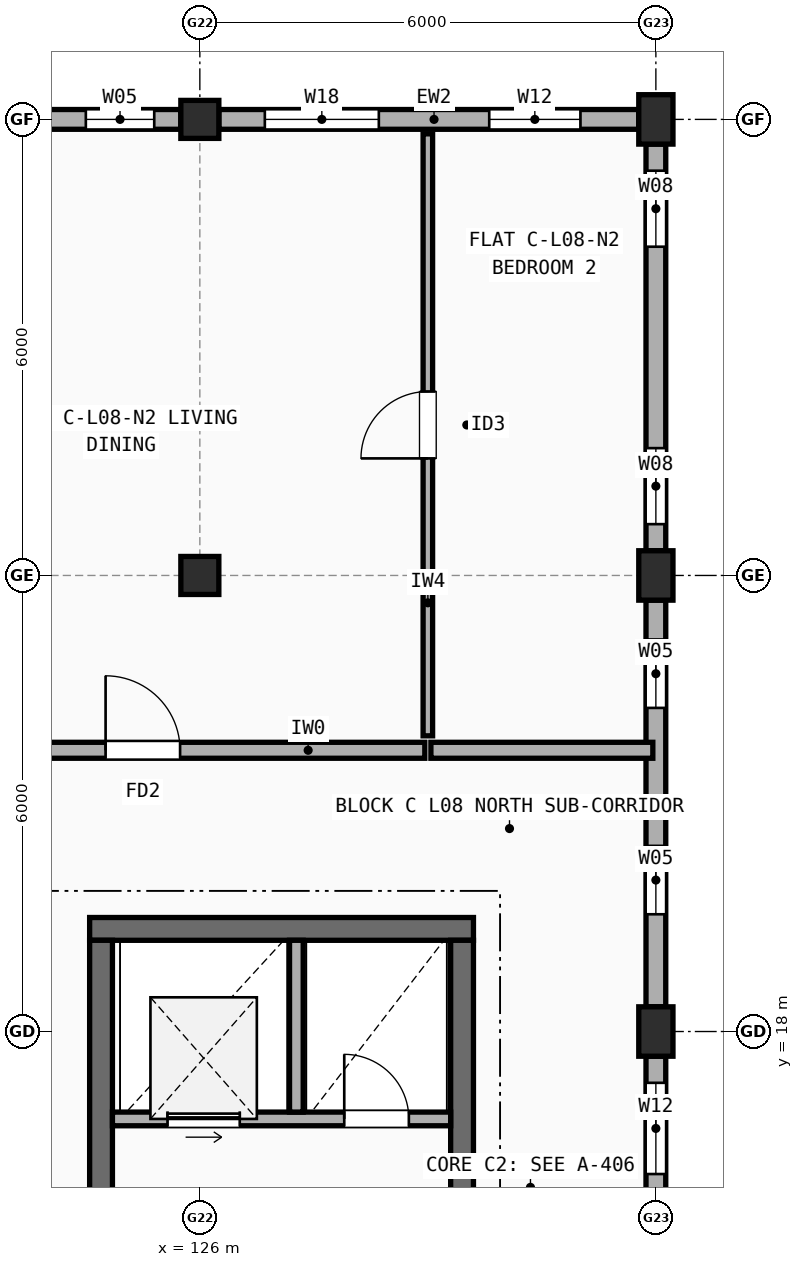
"""IFC4 building model, lengths in metres.
Left out: names, types, materials, properties, quantities, classifications, styles, units other than length and angle.
Written with IfcOpenShell. Run it as: python <this file> out.ifc"""

import sys

from ifc_helpers import new_model, si_unit, direction, frame, frame_2d, origin, origin_2d, place, context, subcontext, project, spatial, rectangle, extrude, element, fill, save


model = new_model("IFC4")
c1 = context("Model", 3, precision=1e-05, world=origin(), true_north=direction((0.0, 1.0)))
c2 = subcontext(c1, "Body", "Model", "MODEL_VIEW")
j1 = project(units=[si_unit("LENGTHUNIT", "METRE"), si_unit("PLANEANGLEUNIT", "RADIAN")], contexts=[c1])
p1 = place(None, origin())
s1 = spatial("IfcSite", under=j1, at=p1, CompositionType="ELEMENT")
p2 = place(p1, origin())
s2 = spatial("IfcBuilding", under=s1, at=p2, CompositionType="ELEMENT")
p3 = place(p2, frame((0.0, 0.0, 26.9)))
s3 = spatial("IfcBuildingStorey", under=s2, at=p3, CompositionType="ELEMENT", Elevation=26.9)
for number, where, z_axis, x_axis in (
    (1, (126.0, 24.0, 0.0), (0.0, 0.0, 1.0), (1.0, 0.0, 0.0)),
    (2, (126.0, 30.0, 0.0), (0.0, 0.0, 1.0), (1.0, 0.0, 0.0)),
):
    element("IfcColumn", number, at=place(p3, frame(where, z_axis=z_axis, x_axis=x_axis)), inside=s3, PredefinedType="COLUMN", context=c2, shape_type="SweptSolid", body=[
        extrude(rectangle(XDim=0.5, YDim=0.5, at=origin_2d()), origin(), (0.0, 0.0, 1.0), 2.98),
    ])
for number, where, z_axis, x_axis in (
    (3, (132.0, 18.0, 0.0), (0.0, 0.0, 1.0), (1.0, 0.0, 0.0)),
    (4, (132.0, 24.0, 0.0), (0.0, 0.0, 1.0), (1.0, 0.0, 0.0)),
    (5, (132.0, 30.0, 0.0), (0.0, 0.0, 1.0), (1.0, 0.0, 0.0)),
):
    element("IfcColumn", number, at=place(p3, frame(where, z_axis=z_axis, x_axis=x_axis)), inside=s3, PredefinedType="COLUMN", context=c2, shape_type="SweptSolid", body=[
        extrude(rectangle(XDim=0.45, YDim=0.65, at=origin_2d()), origin(), (0.0, 0.0, 1.0), 2.98),
    ])
p4 = place(p3, frame((132.0, 12.325, 0.0), z_axis=(0.0, 0.0, 1.0), x_axis=(0.0, 1.0, 0.0)))
e6 = element("IfcWall", 6, at=p4, inside=s3, PredefinedType="STANDARD", context=c2, shape_type="SweptSolid", body=[
    extrude(rectangle(XDim=5.35, YDim=0.26, at=frame_2d((2.675, 0.0))), origin(), (0.0, 0.0, 1.0), 2.462),
])
p5 = place(p4, frame((0.35, 0.0, 0.9)))
e7 = element("IfcOpeningElement", 7, at=p5, cuts=e6, PredefinedType="OPENING", context=c2, shape_type="SweptSolid", body=[
    extrude(rectangle(XDim=1.2, YDim=1.35, at=frame_2d((0.6, 0.675))), frame((0.0, 0.14, 0.0), z_axis=(0.0, -1.0, 0.0), x_axis=(1.0, 0.0, 0.0)), (0.0, 0.0, 1.0), 0.28),
])
p6 = place(p4, frame((3.8, 0.0, 0.9)))
e8 = element("IfcOpeningElement", 8, at=p6, cuts=e6, PredefinedType="OPENING", context=c2, shape_type="SweptSolid", body=[
    extrude(rectangle(XDim=1.2, YDim=1.35, at=frame_2d((0.6, 0.675))), frame((0.0, 0.14, 0.0), z_axis=(0.0, -1.0, 0.0), x_axis=(1.0, 0.0, 0.0)), (0.0, 0.0, 1.0), 0.28),
])
p7 = place(p3, frame((132.0, 18.325, 0.0), z_axis=(0.0, 0.0, 1.0), x_axis=(0.0, 1.0, 0.0)))
e9 = element("IfcWall", 9, at=p7, inside=s3, PredefinedType="STANDARD", context=c2, shape_type="SweptSolid", body=[
    extrude(rectangle(XDim=5.35, YDim=0.26, at=frame_2d((2.675, 0.0))), origin(), (0.0, 0.0, 1.0), 2.462),
])
p8 = place(p7, frame((1.218, 0.0, 0.9)))
e10 = element("IfcOpeningElement", 10, at=p8, cuts=e9, PredefinedType="OPENING", context=c2, shape_type="SweptSolid", body=[
    extrude(rectangle(XDim=0.9, YDim=1.4, at=frame_2d((0.45, 0.7))), frame((0.0, 0.14, 0.0), z_axis=(0.0, -1.0, 0.0), x_axis=(1.0, 0.0, 0.0)), (0.0, 0.0, 1.0), 0.28),
])
p9 = place(p7, frame((3.933, 0.0, 0.9)))
e11 = element("IfcOpeningElement", 11, at=p9, cuts=e9, PredefinedType="OPENING", context=c2, shape_type="SweptSolid", body=[
    extrude(rectangle(XDim=0.9, YDim=1.4, at=frame_2d((0.45, 0.7))), frame((0.0, 0.14, 0.0), z_axis=(0.0, -1.0, 0.0), x_axis=(1.0, 0.0, 0.0)), (0.0, 0.0, 1.0), 0.28),
])
p10 = place(p3, frame((132.0, 24.325, 0.0), z_axis=(0.0, 0.0, 1.0), x_axis=(0.0, 1.0, 0.0)))
e12 = element("IfcWall", 12, at=p10, inside=s3, PredefinedType="STANDARD", context=c2, shape_type="SweptSolid", body=[
    extrude(rectangle(XDim=5.35, YDim=0.26, at=frame_2d((2.675, 0.0))), origin(), (0.0, 0.0, 1.0), 2.462),
])
p11 = place(p10, frame((0.35, 0.0, 0.9)))
e13 = element("IfcOpeningElement", 13, at=p11, cuts=e12, PredefinedType="OPENING", context=c2, shape_type="SweptSolid", body=[
    extrude(rectangle(XDim=1.0, YDim=1.4, at=frame_2d((0.5, 0.7))), frame((0.0, 0.14, 0.0), z_axis=(0.0, -1.0, 0.0), x_axis=(1.0, 0.0, 0.0)), (0.0, 0.0, 1.0), 0.28),
])
p12 = place(p10, frame((4.0, 0.0, 0.9)))
e14 = element("IfcOpeningElement", 14, at=p12, cuts=e12, PredefinedType="OPENING", context=c2, shape_type="SweptSolid", body=[
    extrude(rectangle(XDim=1.0, YDim=1.4, at=frame_2d((0.5, 0.7))), frame((0.0, 0.14, 0.0), z_axis=(0.0, -1.0, 0.0), x_axis=(1.0, 0.0, 0.0)), (0.0, 0.0, 1.0), 0.28),
])
p13 = place(p3, frame((131.775, 30.0, 0.0), z_axis=(0.0, 0.0, 1.0), x_axis=(-1.0, 0.0, 0.0)))
e15 = element("IfcWall", 15, at=p13, inside=s3, PredefinedType="STANDARD", context=c2, shape_type="SweptSolid", body=[
    extrude(rectangle(XDim=5.525, YDim=0.26, at=frame_2d((2.762, 0.0))), origin(), (0.0, 0.0, 1.0), 2.462),
])
p14 = place(p13, frame((0.768, 0.0, 0.9)))
e16 = element("IfcOpeningElement", 16, at=p14, cuts=e15, PredefinedType="OPENING", context=c2, shape_type="SweptSolid", body=[
    extrude(rectangle(XDim=1.2, YDim=1.35, at=frame_2d((0.6, 0.675))), frame((0.0, 0.14, 0.0), z_axis=(0.0, -1.0, 0.0), x_axis=(1.0, 0.0, 0.0)), (0.0, 0.0, 1.0), 0.28),
])
p15 = place(p13, frame((3.42, 0.0, 0.9)))
e17 = element("IfcOpeningElement", 17, at=p15, cuts=e15, PredefinedType="OPENING", context=c2, shape_type="SweptSolid", body=[
    extrude(rectangle(XDim=1.5, YDim=1.4, at=frame_2d((0.75, 0.7))), frame((0.0, 0.14, 0.0), z_axis=(0.0, -1.0, 0.0), x_axis=(1.0, 0.0, 0.0)), (0.0, 0.0, 1.0), 0.28),
])
p16 = place(p3, frame((125.75, 30.0, 0.0), z_axis=(0.0, 0.0, 1.0), x_axis=(-1.0, 0.0, 0.0)))
e18 = element("IfcWall", 18, at=p16, inside=s3, PredefinedType="STANDARD", context=c2, shape_type="SweptSolid", body=[
    extrude(rectangle(XDim=5.5, YDim=0.26, at=frame_2d((2.75, 0.0))), origin(), (0.0, 0.0, 1.0), 2.462),
])
p17 = place(p16, frame((0.35, 0.0, 0.9)))
e19 = element("IfcOpeningElement", 19, at=p17, cuts=e18, PredefinedType="OPENING", context=c2, shape_type="SweptSolid", body=[
    extrude(rectangle(XDim=0.9, YDim=1.4, at=frame_2d((0.45, 0.7))), frame((0.0, 0.14, 0.0), z_axis=(0.0, -1.0, 0.0), x_axis=(1.0, 0.0, 0.0)), (0.0, 0.0, 1.0), 0.28),
])
p18 = place(p16, frame((2.96, 0.0, 0.9)))
e20 = element("IfcOpeningElement", 20, at=p18, cuts=e18, PredefinedType="OPENING", context=c2, shape_type="SweptSolid", body=[
    extrude(rectangle(XDim=0.9, YDim=1.4, at=frame_2d((0.45, 0.7))), frame((0.0, 0.14, 0.0), z_axis=(0.0, -1.0, 0.0), x_axis=(1.0, 0.0, 0.0)), (0.0, 0.0, 1.0), 0.28),
])
p19 = place(p3, frame((129.6, 19.35, 0.0), z_axis=(0.0, 0.0, 1.0), x_axis=(-1.0, 0.0, 0.0)))
e21 = element("IfcWall", 21, at=p19, inside=s3, PredefinedType="SHEAR", context=c2, shape_type="SweptSolid", body=[
    extrude(rectangle(XDim=5.05, YDim=0.3, at=frame_2d((2.525, 0.0))), origin(), (0.0, 0.0, 1.0), 2.98),
])
p20 = place(p3, frame((129.45, 12.75, 0.0), z_axis=(0.0, 0.0, 1.0), x_axis=(0.0, 1.0, 0.0)))
e22 = element("IfcWall", 22, at=p20, inside=s3, PredefinedType="SHEAR", context=c2, shape_type="SweptSolid", body=[
    extrude(rectangle(XDim=6.45, YDim=0.3, at=frame_2d((3.225, 0.0))), origin(), (0.0, 0.0, 1.0), 2.98),
])
p21 = place(p3, frame((124.7, 15.65, 0.0), z_axis=(0.0, 0.0, 1.0), x_axis=(0.0, 1.0, 0.0)))
e23 = element("IfcWall", 23, at=p21, inside=s3, PredefinedType="SHEAR", context=c2, shape_type="SweptSolid", body=[
    extrude(rectangle(XDim=3.55, YDim=0.3, at=frame_2d((1.775, 0.0))), origin(), (0.0, 0.0, 1.0), 2.98),
])
p22 = place(p3, frame((124.85, 16.85, 0.0), z_axis=(0.0, 0.0, 1.0), x_axis=(1.0, 0.0, 0.0)))
e24 = element("IfcWall", 24, at=p22, inside=s3, PredefinedType="SOLIDWALL", context=c2, shape_type="SweptSolid", body=[
    extrude(rectangle(XDim=4.45, YDim=0.18, at=frame_2d((2.225, 0.0))), origin(), (0.0, 0.0, 1.0), 2.98),
])
p23 = place(p22, frame((0.725, 0.0, 0.0)))
e25 = element("IfcOpeningElement", 25, at=p23, cuts=e24, PredefinedType="OPENING", context=c2, shape_type="SweptSolid", body=[
    extrude(rectangle(XDim=0.95, YDim=2.15, at=frame_2d((0.475, 1.075))), frame((0.0, 0.1, 0.0), z_axis=(0.0, -1.0, 0.0), x_axis=(1.0, 0.0, 0.0)), (0.0, 0.0, 1.0), 0.2),
])
p24 = place(p22, frame((3.05, 0.0, 0.0)))
e26 = element("IfcOpeningElement", 26, at=p24, cuts=e24, PredefinedType="OPENING", context=c2, shape_type="SweptSolid", body=[
    extrude(rectangle(XDim=0.85, YDim=2.1, at=frame_2d((0.425, 1.05))), frame((0.0, 0.1, 0.0), z_axis=(0.0, -1.0, 0.0), x_axis=(1.0, 0.0, 0.0)), (0.0, 0.0, 1.0), 0.2),
])
p25 = place(p3, frame((127.27, 16.94, 0.0), z_axis=(0.0, 0.0, 1.0), x_axis=(0.0, 1.0, 0.0)))
e27 = element("IfcWall", 27, at=p25, inside=s3, PredefinedType="SOLIDWALL", context=c2, shape_type="SweptSolid", body=[
    extrude(rectangle(XDim=2.26, YDim=0.18, at=frame_2d((1.13, 0.0))), origin(), (0.0, 0.0, 1.0), 2.98),
])
p26 = place(p3, frame((121.54, 21.7, 0.0), z_axis=(0.0, 0.0, 1.0), x_axis=(1.0, 0.0, 0.0)))
e28 = element("IfcWall", 28, at=p26, inside=s3, PredefinedType="SOLIDWALL", context=c2, shape_type="SweptSolid", body=[
    extrude(rectangle(XDim=7.42, YDim=0.21, at=frame_2d((3.71, 0.0))), origin(), (0.0, 0.0, 1.0), 2.98),
])
p27 = place(p26, frame((3.22, 0.0, 0.0)))
e29 = element("IfcOpeningElement", 29, at=p27, cuts=e28, PredefinedType="OPENING", context=c2, shape_type="SweptSolid", body=[
    extrude(rectangle(XDim=0.98, YDim=2.15, at=frame_2d((0.49, 1.075))), frame((0.0, 0.115, 0.0), z_axis=(0.0, -1.0, 0.0), x_axis=(1.0, 0.0, 0.0)), (0.0, 0.0, 1.0), 0.23),
])
p28 = place(p3, frame((129.04, 21.7, 0.0), z_axis=(0.0, 0.0, 1.0), x_axis=(1.0, 0.0, 0.0)))
e30 = element("IfcWall", 30, at=p28, inside=s3, PredefinedType="SOLIDWALL", context=c2, shape_type="SweptSolid", body=[
    extrude(rectangle(XDim=2.92, YDim=0.21, at=frame_2d((1.46, 0.0))), origin(), (0.0, 0.0, 1.0), 2.462),
])
p29 = place(p3, frame((129.0, 21.89, 0.0), z_axis=(0.0, 0.0, 1.0), x_axis=(0.0, 1.0, 0.0)))
e31 = element("IfcWall", 31, at=p29, inside=s3, PredefinedType="PARTITIONING", context=c2, shape_type="SweptSolid", body=[
    extrude(rectangle(XDim=7.92, YDim=0.125, at=frame_2d((3.96, 0.0))), origin(), (0.0, 0.0, 1.0), 2.408),
])
p30 = place(p29, frame((3.65, 0.0, 0.0)))
e32 = element("IfcOpeningElement", 32, at=p30, cuts=e31, PredefinedType="OPENING", context=c2, shape_type="SweptSolid", body=[
    extrude(rectangle(XDim=0.88, YDim=2.1, at=frame_2d((0.44, 1.05))), frame((0.0, 0.073, 0.0), z_axis=(0.0, -1.0, 0.0), x_axis=(1.0, 0.0, 0.0)), (0.0, 0.0, 1.0), 0.145),
])
p31 = place(p6, origin())
e33 = element("IfcWindow", 33, at=p31, inside=s3, PartitioningType="SINGLE_PANEL", PredefinedType="WINDOW", context=c2, shape_type="SweptSolid", body=[
    extrude(rectangle(XDim=1.2, YDim=1.35, at=frame_2d((0.6, 0.675))), frame((0.0, 0.03, 0.0), z_axis=(0.0, -1.0, 0.0), x_axis=(1.0, 0.0, 0.0)), (0.0, 0.0, 1.0), 0.06),
])
fill(e8, e33)
p32 = place(p8, origin())
e34 = element("IfcWindow", 34, at=p32, inside=s3, PartitioningType="SINGLE_PANEL", PredefinedType="WINDOW", context=c2, shape_type="SweptSolid", body=[
    extrude(rectangle(XDim=0.9, YDim=1.4, at=frame_2d((0.45, 0.7))), frame((0.0, 0.03, 0.0), z_axis=(0.0, -1.0, 0.0), x_axis=(1.0, 0.0, 0.0)), (0.0, 0.0, 1.0), 0.06),
])
fill(e10, e34)
p33 = place(p9, origin())
e35 = element("IfcWindow", 35, at=p33, inside=s3, PartitioningType="SINGLE_PANEL", PredefinedType="WINDOW", context=c2, shape_type="SweptSolid", body=[
    extrude(rectangle(XDim=0.9, YDim=1.4, at=frame_2d((0.45, 0.7))), frame((0.0, 0.03, 0.0), z_axis=(0.0, -1.0, 0.0), x_axis=(1.0, 0.0, 0.0)), (0.0, 0.0, 1.0), 0.06),
])
fill(e11, e35)
p34 = place(p11, origin())
e36 = element("IfcWindow", 36, at=p34, inside=s3, PartitioningType="SINGLE_PANEL", PredefinedType="WINDOW", context=c2, shape_type="SweptSolid", body=[
    extrude(rectangle(XDim=1.0, YDim=1.4, at=frame_2d((0.5, 0.7))), frame((0.0, 0.03, 0.0), z_axis=(0.0, -1.0, 0.0), x_axis=(1.0, 0.0, 0.0)), (0.0, 0.0, 1.0), 0.06),
])
fill(e13, e36)
p35 = place(p12, origin())
e37 = element("IfcWindow", 37, at=p35, inside=s3, PartitioningType="SINGLE_PANEL", PredefinedType="WINDOW", context=c2, shape_type="SweptSolid", body=[
    extrude(rectangle(XDim=1.0, YDim=1.4, at=frame_2d((0.5, 0.7))), frame((0.0, 0.03, 0.0), z_axis=(0.0, -1.0, 0.0), x_axis=(1.0, 0.0, 0.0)), (0.0, 0.0, 1.0), 0.06),
])
fill(e14, e37)
p36 = place(p14, origin())
e38 = element("IfcWindow", 38, at=p36, inside=s3, PartitioningType="SINGLE_PANEL", PredefinedType="WINDOW", context=c2, shape_type="SweptSolid", body=[
    extrude(rectangle(XDim=1.2, YDim=1.35, at=frame_2d((0.6, 0.675))), frame((0.0, 0.03, 0.0), z_axis=(0.0, -1.0, 0.0), x_axis=(1.0, 0.0, 0.0)), (0.0, 0.0, 1.0), 0.06),
])
fill(e16, e38)
p37 = place(p15, origin())
e39 = element("IfcWindow", 39, at=p37, inside=s3, PartitioningType="SINGLE_PANEL", PredefinedType="WINDOW", context=c2, shape_type="SweptSolid", body=[
    extrude(rectangle(XDim=1.5, YDim=1.4, at=frame_2d((0.75, 0.7))), frame((0.0, 0.03, 0.0), z_axis=(0.0, -1.0, 0.0), x_axis=(1.0, 0.0, 0.0)), (0.0, 0.0, 1.0), 0.06),
])
fill(e17, e39)
p38 = place(p17, origin())
e40 = element("IfcWindow", 40, at=p38, inside=s3, PartitioningType="SINGLE_PANEL", PredefinedType="WINDOW", context=c2, shape_type="SweptSolid", body=[
    extrude(rectangle(XDim=0.9, YDim=1.4, at=frame_2d((0.45, 0.7))), frame((0.0, 0.03, 0.0), z_axis=(0.0, -1.0, 0.0), x_axis=(1.0, 0.0, 0.0)), (0.0, 0.0, 1.0), 0.06),
])
fill(e19, e40)
p39 = place(p23, origin())
e41 = element("IfcDoor", 41, at=p39, inside=s3, OperationType="SLIDING_TO_LEFT", PredefinedType="DOOR", context=c2, shape_type="SweptSolid", body=[
    extrude(rectangle(XDim=0.95, YDim=2.15, at=frame_2d((0.475, 1.075))), frame((0.0, 0.025, 0.0), z_axis=(0.0, -1.0, 0.0), x_axis=(1.0, 0.0, 0.0)), (0.0, 0.0, 1.0), 0.05),
])
fill(e25, e41)
p40 = place(p24, frame((0.85, 0.0, 0.0), z_axis=(0.0, 0.0, 1.0), x_axis=(-1.0, 0.0, 0.0)))
e42 = element("IfcDoor", 42, at=p40, inside=s3, OperationType="SINGLE_SWING_LEFT", PredefinedType="DOOR", context=c2, shape_type="SweptSolid", body=[
    extrude(rectangle(XDim=0.85, YDim=2.1, at=frame_2d((0.425, 1.05))), frame((0.0, 0.025, 0.0), z_axis=(0.0, -1.0, 0.0), x_axis=(1.0, 0.0, 0.0)), (0.0, 0.0, 1.0), 0.05),
])
fill(e26, e42)
p41 = place(p27, origin())
e43 = element("IfcDoor", 43, at=p41, inside=s3, OperationType="SINGLE_SWING_LEFT", PredefinedType="DOOR", context=c2, shape_type="SweptSolid", body=[
    extrude(rectangle(XDim=0.98, YDim=2.15, at=frame_2d((0.49, 1.075))), frame((0.0, 0.025, 0.0), z_axis=(0.0, -1.0, 0.0), x_axis=(1.0, 0.0, 0.0)), (0.0, 0.0, 1.0), 0.05),
])
fill(e29, e43)
p42 = place(p30, origin())
e44 = element("IfcDoor", 44, at=p42, inside=s3, OperationType="SINGLE_SWING_LEFT", PredefinedType="DOOR", context=c2, shape_type="SweptSolid", body=[
    extrude(rectangle(XDim=0.88, YDim=2.1, at=frame_2d((0.44, 1.05))), frame((0.0, 0.025, 0.0), z_axis=(0.0, -1.0, 0.0), x_axis=(1.0, 0.0, 0.0)), (0.0, 0.0, 1.0), 0.05),
])
fill(e32, e44)
save(model, sys.argv[1])
